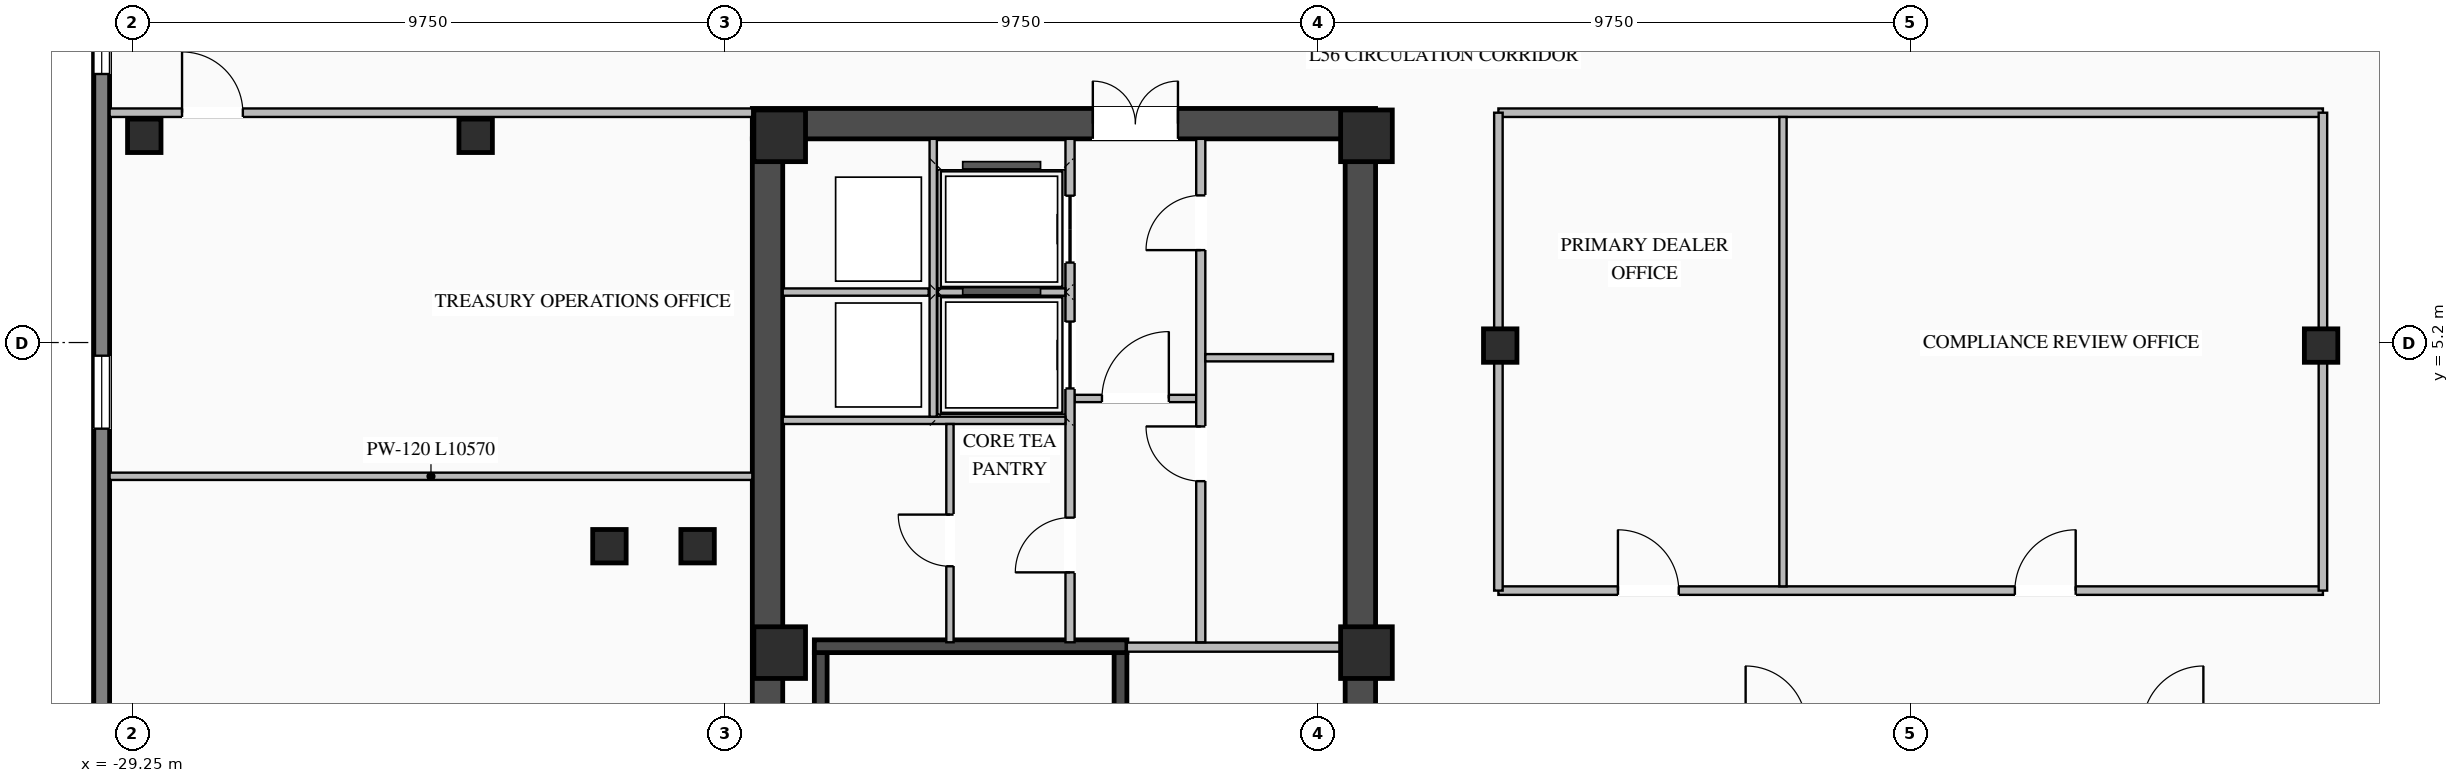
"""IFC4 building model, lengths in metres.
Left out: names, types, materials, properties, quantities, classifications, styles, units other than length and angle.
Written with IfcOpenShell. Run it as: python <this file> out.ifc"""

import sys

from ifc_helpers import new_model, si_unit, direction, frame, frame_2d, origin, origin_2d, place, context, subcontext, project, spatial, rectangle, i_section, extrude, element, fill, save


model = new_model("IFC4")
c1 = context("Model", 3, precision=1e-05, world=origin(), true_north=direction((0.0, 1.0)))
c2 = subcontext(c1, "Body", "Model", "MODEL_VIEW")
j1 = project(units=[si_unit("LENGTHUNIT", "METRE"), si_unit("PLANEANGLEUNIT", "RADIAN")], contexts=[c1])
p1 = place(None, origin())
s1 = spatial("IfcSite", under=j1, at=p1, CompositionType="ELEMENT")
p2 = place(p1, origin())
s2 = spatial("IfcBuilding", under=s1, at=p2, CompositionType="ELEMENT")
p3 = place(p2, frame((0.0, 0.0, 208.5)))
s3 = spatial("IfcBuildingStorey", under=s2, at=p3, CompositionType="ELEMENT", Elevation=208.5)
p4 = place(p3, frame((-19.05, 8.8, 0.0), z_axis=(0.0, 0.0, 1.0), x_axis=(1.0, 0.0, 0.0)))
e1 = element("IfcWall", 1, at=p4, inside=s3, PredefinedType="SHEAR", context=c2, shape_type="SweptSolid", body=[
    extrude(rectangle(XDim=10.25, YDim=0.5, at=frame_2d((5.125, 0.0))), origin(), (0.0, 0.0, 1.0), 3.27),
])
p5 = place(p4, frame((5.6, 0.0, 0.0)))
e2 = element("IfcOpeningElement", 2, at=p5, cuts=e1, PredefinedType="OPENING", context=c2, shape_type="SweptSolid", body=[
    extrude(rectangle(XDim=1.4, YDim=2.05, at=frame_2d((0.7, 1.025))), frame((0.0, 0.26, 0.0), z_axis=(0.0, -1.0, 0.0), x_axis=(1.0, 0.0, 0.0)), (0.0, 0.0, 1.0), 0.52),
])
p6 = place(p3, frame((-18.8, -8.55, 0.0), z_axis=(0.0, 0.0, 1.0), x_axis=(0.0, 1.0, 0.0)))
e3 = element("IfcWall", 3, at=p6, inside=s3, PredefinedType="SHEAR", context=c2, shape_type="SweptSolid", body=[
    extrude(rectangle(XDim=17.1, YDim=0.5, at=frame_2d((8.55, 0.0))), origin(), (0.0, 0.0, 1.0), 3.27),
])
p7 = place(p3, frame((-9.05, -8.55, 0.0), z_axis=(0.0, 0.0, 1.0), x_axis=(0.0, 1.0, 0.0)))
e4 = element("IfcWall", 4, at=p7, inside=s3, PredefinedType="SHEAR", context=c2, shape_type="SweptSolid", body=[
    extrude(rectangle(XDim=17.1, YDim=0.5, at=frame_2d((8.55, 0.0))), origin(), (0.0, 0.0, 1.0), 3.27),
])
p8 = place(p7, frame((5.3, 0.0, 0.0)))
e5 = element("IfcOpeningElement", 5, at=p8, cuts=e4, PredefinedType="OPENING", context=c2, shape_type="SweptSolid", body=[
    extrude(rectangle(XDim=1.1, YDim=2.08, at=frame_2d((0.55, 1.04))), frame((0.0, 0.26, 0.0), z_axis=(0.0, -1.0, 0.0), x_axis=(1.0, 0.0, 0.0)), (0.0, 0.0, 1.0), 0.52),
])
p9 = place(p3, frame((-12.995, -8.1, 0.0), z_axis=(0.0, 0.0, 1.0), x_axis=(0.0, 1.0, 0.0)))
e6 = element("IfcWall", 6, at=p9, inside=s3, PredefinedType="SHEAR", context=c2, shape_type="SweptSolid", body=[
    extrude(rectangle(XDim=8.2, YDim=0.21, at=frame_2d((4.1, 0.0))), origin(), (0.0, 0.0, 1.0), 3.27),
])
p10 = place(p9, frame((6.25, 0.0, 0.0)))
e7 = element("IfcOpeningElement", 7, at=p10, cuts=e6, PredefinedType="OPENING", context=c2, shape_type="SweptSolid", body=[
    extrude(rectangle(XDim=1.1, YDim=2.15, at=frame_2d((0.55, 1.075))), frame((0.0, 0.115, 0.0), z_axis=(0.0, -1.0, 0.0), x_axis=(1.0, 0.0, 0.0)), (0.0, 0.0, 1.0), 0.23),
])
p11 = place(p3, frame((-17.925, -8.1, 0.0), z_axis=(0.0, 0.0, 1.0), x_axis=(0.0, 1.0, 0.0)))
e8 = element("IfcWall", 8, at=p11, inside=s3, PredefinedType="SHEAR", context=c2, shape_type="SweptSolid", body=[
    extrude(rectangle(XDim=8.2, YDim=0.21, at=frame_2d((4.1, 0.0))), origin(), (0.0, 0.0, 1.0), 3.27),
])
p12 = place(p3, frame((-12.89, 0.205, 0.0), z_axis=(0.0, 0.0, 1.0), x_axis=(-1.0, 0.0, 0.0)))
e9 = element("IfcWall", 9, at=p12, inside=s3, PredefinedType="SHEAR", context=c2, shape_type="SweptSolid", body=[
    extrude(rectangle(XDim=5.14, YDim=0.21, at=frame_2d((2.57, 0.0))), origin(), (0.0, 0.0, 1.0), 3.27),
])
for number, where, z_axis, x_axis in (
    (10, (-8.95, 0.1, 0.0), (0.0, 0.0, 1.0), (1.0, 0.0, 0.0)),
    (11, (-8.95, 8.6, 0.0), (0.0, 0.0, 1.0), (1.0, 0.0, 0.0)),
    (12, (-18.6, 0.1, 0.0), (0.0, 0.0, 1.0), (1.0, 0.0, 0.0)),
    (13, (-18.6, 8.6, 0.0), (0.0, 0.0, 1.0), (1.0, 0.0, 0.0)),
):
    element("IfcColumn", number, at=place(p3, frame(where, z_axis=z_axis, x_axis=x_axis)), inside=s3, PredefinedType="COLUMN", context=c2, shape_type="SweptSolid", body=[
        extrude(rectangle(XDim=0.85, YDim=0.85, at=origin_2d()), origin(), (0.0, 0.0, 1.0), 3.45),
    ])
for number, where, z_axis, x_axis in (
    (14, (-6.75, 5.15, 0.0), (0.0, 0.0, 1.0), (1.0, 0.0, 0.0)),
    (15, (6.75, 5.15, 0.0), (0.0, 0.0, 1.0), (1.0, 0.0, 0.0)),
    (16, (-21.4, 1.85, 0.0), (0.0, 0.0, 1.0), (1.0, 0.0, 0.0)),
    (17, (-19.95, 1.85, 0.0), (0.0, 0.0, 1.0), (1.0, 0.0, 0.0)),
    (18, (-23.6, 8.6, 0.0), (0.0, 0.0, 1.0), (1.0, 0.0, 0.0)),
    (19, (-29.05, 8.6, 0.0), (0.0, 0.0, 1.0), (1.0, 0.0, 0.0)),
):
    element("IfcColumn", number, at=place(p3, frame(where, z_axis=z_axis, x_axis=x_axis)), inside=s3, PredefinedType="COLUMN", context=c2, shape_type="SweptSolid", body=[
        extrude(i_section(OverallWidth=0.55, OverallDepth=0.55, WebThickness=0.024, FlangeThickness=0.036, at=origin_2d()), origin(), (0.0, 0.0, 1.0), 3.45),
    ])
p13 = place(p3, frame((-29.75, -0.9, 0.0), z_axis=(0.0, 0.0, 1.0), x_axis=(0.0, 1.0, 0.0)))
e20 = element("IfcWall", 20, at=p13, inside=s3, PredefinedType="STANDARD", context=c2, shape_type="SweptSolid", body=[
    extrude(rectangle(XDim=15.85, YDim=0.26, at=frame_2d((7.925, 0.0))), origin(), (0.0, 0.0, 1.0), 3.25),
])
p14 = place(p13, frame((4.683, 0.0, 0.76)))
e21 = element("IfcOpeningElement", 21, at=p14, cuts=e20, PredefinedType="OPENING", context=c2, shape_type="SweptSolid", body=[
    extrude(rectangle(XDim=1.2, YDim=1.95, at=frame_2d((0.6, 0.975))), frame((0.0, 0.14, 0.0), z_axis=(0.0, -1.0, 0.0), x_axis=(1.0, 0.0, 0.0)), (0.0, 0.0, 1.0), 0.28),
])
p15 = place(p13, frame((10.517, 0.0, 0.76)))
e22 = element("IfcOpeningElement", 22, at=p15, cuts=e20, PredefinedType="OPENING", context=c2, shape_type="SweptSolid", body=[
    extrude(rectangle(XDim=1.2, YDim=1.95, at=frame_2d((0.6, 0.975))), frame((0.0, 0.14, 0.0), z_axis=(0.0, -1.0, 0.0), x_axis=(1.0, 0.0, 0.0)), (0.0, 0.0, 1.0), 0.28),
])
p16 = place(p3, frame((-12.89, 0.19, 0.0), z_axis=(0.0, 0.0, 1.0), x_axis=(1.0, 0.0, 0.0)))
e23 = element("IfcWall", 23, at=p16, inside=s3, PredefinedType="STANDARD", context=c2, shape_type="SweptSolid", body=[
    extrude(rectangle(XDim=3.59, YDim=0.15, at=frame_2d((1.795, 0.0))), origin(), (0.0, 0.0, 1.0), 2.645),
])
p17 = place(p3, frame((-13.75, 4.28, 0.0), z_axis=(0.0, 0.0, 1.0), x_axis=(1.0, 0.0, 0.0)))
e24 = element("IfcWall", 24, at=p17, inside=s3, PredefinedType="STANDARD", context=c2, shape_type="SweptSolid", body=[
    extrude(rectangle(XDim=2.0, YDim=0.12, at=frame_2d((1.0, 0.0))), origin(), (0.0, 0.0, 1.0), 3.25),
])
p18 = place(p17, frame((0.45, 0.0, 0.0)))
e25 = element("IfcOpeningElement", 25, at=p18, cuts=e24, PredefinedType="OPENING", context=c2, shape_type="SweptSolid", body=[
    extrude(rectangle(XDim=1.1, YDim=2.1, at=frame_2d((0.55, 1.05))), frame((0.0, 0.07, 0.0), z_axis=(0.0, -1.0, 0.0), x_axis=(1.0, 0.0, 0.0)), (0.0, 0.0, 1.0), 0.14),
])
p19 = place(p3, frame((-11.675, 0.27, 0.0), z_axis=(0.0, 0.0, 1.0), x_axis=(0.0, 1.0, 0.0)))
e26 = element("IfcWall", 26, at=p19, inside=s3, PredefinedType="STANDARD", context=c2, shape_type="SweptSolid", body=[
    extrude(rectangle(XDim=8.28, YDim=0.15, at=frame_2d((4.14, 0.0))), origin(), (0.0, 0.0, 1.0), 3.25),
])
p20 = place(p19, frame((2.65, 0.0, 0.0)))
e27 = element("IfcOpeningElement", 27, at=p20, cuts=e26, PredefinedType="OPENING", context=c2, shape_type="SweptSolid", body=[
    extrude(rectangle(XDim=0.9, YDim=2.05, at=frame_2d((0.45, 1.025))), frame((0.0, 0.085, 0.0), z_axis=(0.0, -1.0, 0.0), x_axis=(1.0, 0.0, 0.0)), (0.0, 0.0, 1.0), 0.17),
])
p21 = place(p19, frame((6.45, 0.0, 0.0)))
e28 = element("IfcOpeningElement", 28, at=p21, cuts=e26, PredefinedType="OPENING", context=c2, shape_type="SweptSolid", body=[
    extrude(rectangle(XDim=0.9, YDim=2.05, at=frame_2d((0.45, 1.025))), frame((0.0, 0.085, 0.0), z_axis=(0.0, -1.0, 0.0), x_axis=(1.0, 0.0, 0.0)), (0.0, 0.0, 1.0), 0.17),
])
p22 = place(p3, frame((-11.6, 4.95, 0.0), z_axis=(0.0, 0.0, 1.0), x_axis=(1.0, 0.0, 0.0)))
e29 = element("IfcWall", 29, at=p22, inside=s3, PredefinedType="STANDARD", context=c2, shape_type="SweptSolid", body=[
    extrude(rectangle(XDim=2.1, YDim=0.12, at=frame_2d((1.05, 0.0))), origin(), (0.0, 0.0, 1.0), 3.25),
])
p23 = place(p3, frame((-13.825, 0.27, 0.0), z_axis=(0.0, 0.0, 1.0), x_axis=(0.0, 1.0, 0.0)))
e30 = element("IfcWall", 30, at=p23, inside=s3, PredefinedType="STANDARD", context=c2, shape_type="SweptSolid", body=[
    extrude(rectangle(XDim=8.28, YDim=0.15, at=frame_2d((4.14, 0.0))), origin(), (0.0, 0.0, 1.0), 3.25),
])
p24 = place(p23, frame((4.175, 0.0, 0.0)))
e31 = element("IfcOpeningElement", 31, at=p24, cuts=e30, PredefinedType="OPENING", context=c2, shape_type="SweptSolid", body=[
    extrude(rectangle(XDim=1.1, YDim=2.1, at=frame_2d((0.55, 1.05))), frame((0.0, 0.085, 0.0), z_axis=(0.0, -1.0, 0.0), x_axis=(1.0, 0.0, 0.0)), (0.0, 0.0, 1.0), 0.17),
])
p25 = place(p23, frame((6.245, 0.0, 0.0)))
e32 = element("IfcOpeningElement", 32, at=p25, cuts=e30, PredefinedType="OPENING", context=c2, shape_type="SweptSolid", body=[
    extrude(rectangle(XDim=1.1, YDim=2.1, at=frame_2d((0.55, 1.05))), frame((0.0, 0.085, 0.0), z_axis=(0.0, -1.0, 0.0), x_axis=(1.0, 0.0, 0.0)), (0.0, 0.0, 1.0), 0.17),
])
p26 = place(p23, frame((1.15, 0.0, 0.0)))
e33 = element("IfcOpeningElement", 33, at=p26, cuts=e30, PredefinedType="OPENING", context=c2, shape_type="SweptSolid", body=[
    extrude(rectangle(XDim=0.9, YDim=2.05, at=frame_2d((0.45, 1.025))), frame((0.0, 0.085, 0.0), z_axis=(0.0, -1.0, 0.0), x_axis=(1.0, 0.0, 0.0)), (0.0, 0.0, 1.0), 0.17),
])
p27 = place(p3, frame((-18.55, 3.92, 0.0), z_axis=(0.0, 0.0, 1.0), x_axis=(1.0, 0.0, 0.0)))
e34 = element("IfcWall", 34, at=p27, inside=s3, PredefinedType="STANDARD", context=c2, shape_type="SweptSolid", body=[
    extrude(rectangle(XDim=4.65, YDim=0.12, at=frame_2d((2.325, 0.0))), origin(), (0.0, 0.0, 1.0), 3.25),
])
p28 = place(p3, frame((-18.55, 6.03, 0.0), z_axis=(0.0, 0.0, 1.0), x_axis=(1.0, 0.0, 0.0)))
e35 = element("IfcWall", 35, at=p28, inside=s3, PredefinedType="STANDARD", context=c2, shape_type="SweptSolid", body=[
    extrude(rectangle(XDim=2.4, YDim=0.12, at=frame_2d((1.2, 0.0))), origin(), (0.0, 0.0, 1.0), 3.25),
])
p29 = place(p3, frame((-16.075, 3.98, 0.0), z_axis=(0.0, 0.0, 1.0), x_axis=(0.0, 1.0, 0.0)))
e36 = element("IfcWall", 36, at=p29, inside=s3, PredefinedType="STANDARD", context=c2, shape_type="SweptSolid", body=[
    extrude(rectangle(XDim=4.57, YDim=0.12, at=frame_2d((2.285, 0.0))), origin(), (0.0, 0.0, 1.0), 3.25),
])
p30 = place(p3, frame((-16.0, 6.03, 0.0), z_axis=(0.0, 0.0, 1.0), x_axis=(1.0, 0.0, 0.0)))
e37 = element("IfcWall", 37, at=p30, inside=s3, PredefinedType="STANDARD", context=c2, shape_type="SweptSolid", body=[
    extrude(rectangle(XDim=2.1, YDim=0.12, at=frame_2d((1.05, 0.0))), origin(), (0.0, 0.0, 1.0), 3.25),
])
p31 = place(p3, frame((-15.8, 0.27, 0.0), z_axis=(0.0, 0.0, 1.0), x_axis=(0.0, 1.0, 0.0)))
e38 = element("IfcWall", 38, at=p31, inside=s3, PredefinedType="STANDARD", context=c2, shape_type="SweptSolid", body=[
    extrude(rectangle(XDim=3.59, YDim=0.12, at=frame_2d((1.795, 0.0))), origin(), (0.0, 0.0, 1.0), 3.25),
])
p32 = place(p31, frame((1.25, 0.0, 0.0)))
e39 = element("IfcOpeningElement", 39, at=p32, cuts=e38, PredefinedType="OPENING", context=c2, shape_type="SweptSolid", body=[
    extrude(rectangle(XDim=0.85, YDim=2.05, at=frame_2d((0.425, 1.025))), frame((0.0, 0.07, 0.0), z_axis=(0.0, -1.0, 0.0), x_axis=(1.0, 0.0, 0.0)), (0.0, 0.0, 1.0), 0.14),
])
p33 = place(p3, frame((-29.62, 8.98, 0.0), z_axis=(0.0, 0.0, 1.0), x_axis=(1.0, 0.0, 0.0)))
e40 = element("IfcWall", 40, at=p33, inside=s3, PredefinedType="STANDARD", context=c2, shape_type="SweptSolid", body=[
    extrude(rectangle(XDim=10.57, YDim=0.14, at=frame_2d((5.285, 0.0))), origin(), (0.0, 0.0, 1.0), 3.25),
])
p34 = place(p33, frame((1.191, 0.0, 0.0)))
e41 = element("IfcOpeningElement", 41, at=p34, cuts=e40, PredefinedType="OPENING", context=c2, shape_type="SweptSolid", body=[
    extrude(rectangle(XDim=1.0, YDim=2.08, at=frame_2d((0.5, 1.04))), frame((0.0, 0.08, 0.0), z_axis=(0.0, -1.0, 0.0), x_axis=(1.0, 0.0, 0.0)), (0.0, 0.0, 1.0), 0.16),
])
p35 = place(p3, frame((-29.62, 3.0, 0.0), z_axis=(0.0, 0.0, 1.0), x_axis=(1.0, 0.0, 0.0)))
e42 = element("IfcWall", 42, at=p35, inside=s3, PredefinedType="STANDARD", context=c2, shape_type="SweptSolid", body=[
    extrude(rectangle(XDim=10.57, YDim=0.12, at=frame_2d((5.285, 0.0))), origin(), (0.0, 0.0, 1.0), 3.25),
])
p36 = place(p3, frame((-6.78, 1.12, 0.0), z_axis=(0.0, 0.0, 1.0), x_axis=(1.0, 0.0, 0.0)))
e43 = element("IfcWall", 43, at=p36, inside=s3, PredefinedType="STANDARD", context=c2, shape_type="SweptSolid", body=[
    extrude(rectangle(XDim=13.56, YDim=0.14, at=frame_2d((6.78, 0.0))), origin(), (0.0, 0.0, 1.0), 3.25),
])
p37 = place(p36, frame((1.966, 0.0, 0.0)))
e44 = element("IfcOpeningElement", 44, at=p37, cuts=e43, PredefinedType="OPENING", context=c2, shape_type="SweptSolid", body=[
    extrude(rectangle(XDim=1.0, YDim=2.08, at=frame_2d((0.5, 1.04))), frame((0.0, 0.08, 0.0), z_axis=(0.0, -1.0, 0.0), x_axis=(1.0, 0.0, 0.0)), (0.0, 0.0, 1.0), 0.16),
])
p38 = place(p36, frame((8.494, 0.0, 0.0)))
e45 = element("IfcOpeningElement", 45, at=p38, cuts=e43, PredefinedType="OPENING", context=c2, shape_type="SweptSolid", body=[
    extrude(rectangle(XDim=1.0, YDim=2.08, at=frame_2d((0.5, 1.04))), frame((0.0, 0.08, 0.0), z_axis=(0.0, -1.0, 0.0), x_axis=(1.0, 0.0, 0.0)), (0.0, 0.0, 1.0), 0.16),
])
p39 = place(p3, frame((-6.78, 8.98, 0.0), z_axis=(0.0, 0.0, 1.0), x_axis=(1.0, 0.0, 0.0)))
e46 = element("IfcWall", 46, at=p39, inside=s3, PredefinedType="STANDARD", context=c2, shape_type="SweptSolid", body=[
    extrude(rectangle(XDim=13.56, YDim=0.14, at=frame_2d((6.78, 0.0))), origin(), (0.0, 0.0, 1.0), 3.25),
])
for number, where, z_axis, x_axis in (
    (47, (-6.78, 1.12, 0.0), (0.0, 0.0, 1.0), (0.0, 1.0, 0.0)),
    (48, (6.78, 1.12, 0.0), (0.0, 0.0, 1.0), (0.0, 1.0, 0.0)),
):
    element("IfcWall", number, at=place(p3, frame(where, z_axis=z_axis, x_axis=x_axis)), inside=s3, PredefinedType="STANDARD", context=c2, shape_type="SweptSolid", body=[
        extrude(rectangle(XDim=7.86, YDim=0.14, at=frame_2d((3.93, 0.0))), origin(), (0.0, 0.0, 1.0), 2.645),
    ])
p40 = place(p3, frame((-2.1, 1.19, 0.0), z_axis=(0.0, 0.0, 1.0), x_axis=(0.0, 1.0, 0.0)))
e49 = element("IfcWall", 49, at=p40, inside=s3, PredefinedType="STANDARD", context=c2, shape_type="SweptSolid", body=[
    extrude(rectangle(XDim=7.72, YDim=0.12, at=frame_2d((3.86, 0.0))), origin(), (0.0, 0.0, 1.0), 3.25),
])
p41 = place(p14, origin())
e50 = element("IfcWindow", 50, at=p41, inside=s3, PartitioningType="SINGLE_PANEL", PredefinedType="WINDOW", context=c2, shape_type="SweptSolid", body=[
    extrude(rectangle(XDim=1.2, YDim=1.95, at=frame_2d((0.6, 0.975))), frame((0.0, 0.03, 0.0), z_axis=(0.0, -1.0, 0.0), x_axis=(1.0, 0.0, 0.0)), (0.0, 0.0, 1.0), 0.06),
])
fill(e21, e50)
p42 = place(p15, origin())
e51 = element("IfcWindow", 51, at=p42, inside=s3, PartitioningType="SINGLE_PANEL", PredefinedType="WINDOW", context=c2, shape_type="SweptSolid", body=[
    extrude(rectangle(XDim=1.2, YDim=1.95, at=frame_2d((0.6, 0.975))), frame((0.0, 0.03, 0.0), z_axis=(0.0, -1.0, 0.0), x_axis=(1.0, 0.0, 0.0)), (0.0, 0.0, 1.0), 0.06),
])
fill(e22, e51)
p43 = place(p18, origin())
e52 = element("IfcDoor", 52, at=p43, inside=s3, OperationType="SINGLE_SWING_RIGHT", PredefinedType="DOOR", context=c2, shape_type="SweptSolid", body=[
    extrude(rectangle(XDim=1.1, YDim=2.1, at=frame_2d((0.55, 1.05))), frame((0.0, 0.025, 0.0), z_axis=(0.0, -1.0, 0.0), x_axis=(1.0, 0.0, 0.0)), (0.0, 0.0, 1.0), 0.05),
])
fill(e25, e52)
p44 = place(p5, origin())
e53 = element("IfcDoor", 53, at=p44, inside=s3, OperationType="DOUBLE_DOOR_SINGLE_SWING", PredefinedType="DOOR", context=c2, shape_type="SweptSolid", body=[
    extrude(rectangle(XDim=1.4, YDim=2.05, at=frame_2d((0.7, 1.025))), frame((0.0, 0.195, 0.0), z_axis=(0.0, -1.0, 0.0), x_axis=(1.0, 0.0, 0.0)), (0.0, 0.0, 1.0), 0.05),
])
fill(e2, e53)
p45 = place(p20, origin())
e54 = element("IfcDoor", 54, at=p45, inside=s3, OperationType="SINGLE_SWING_RIGHT", PredefinedType="DOOR", context=c2, shape_type="SweptSolid", body=[
    extrude(rectangle(XDim=0.9, YDim=2.05, at=frame_2d((0.45, 1.025))), frame((0.0, 0.025, 0.0), z_axis=(0.0, -1.0, 0.0), x_axis=(1.0, 0.0, 0.0)), (0.0, 0.0, 1.0), 0.05),
])
fill(e27, e54)
p46 = place(p21, origin())
e55 = element("IfcDoor", 55, at=p46, inside=s3, OperationType="SINGLE_SWING_LEFT", PredefinedType="DOOR", context=c2, shape_type="SweptSolid", body=[
    extrude(rectangle(XDim=0.9, YDim=2.05, at=frame_2d((0.45, 1.025))), frame((0.0, 0.025, 0.0), z_axis=(0.0, -1.0, 0.0), x_axis=(1.0, 0.0, 0.0)), (0.0, 0.0, 1.0), 0.05),
])
fill(e28, e55)
p47 = place(p24, origin())
e56 = element("IfcDoor", 56, at=p47, inside=s3, OperationType="DOUBLE_DOOR_SLIDING", PredefinedType="DOOR", context=c2, shape_type="SweptSolid", body=[
    extrude(rectangle(XDim=1.1, YDim=2.1, at=frame_2d((0.55, 1.05))), frame((0.0, 0.025, 0.0), z_axis=(0.0, -1.0, 0.0), x_axis=(1.0, 0.0, 0.0)), (0.0, 0.0, 1.0), 0.05),
])
fill(e31, e56)
p48 = place(p25, origin())
e57 = element("IfcDoor", 57, at=p48, inside=s3, OperationType="DOUBLE_DOOR_SLIDING", PredefinedType="DOOR", context=c2, shape_type="SweptSolid", body=[
    extrude(rectangle(XDim=1.1, YDim=2.1, at=frame_2d((0.55, 1.05))), frame((0.0, 0.025, 0.0), z_axis=(0.0, -1.0, 0.0), x_axis=(1.0, 0.0, 0.0)), (0.0, 0.0, 1.0), 0.05),
])
fill(e32, e57)
p49 = place(p26, origin())
e58 = element("IfcDoor", 58, at=p49, inside=s3, OperationType="SINGLE_SWING_LEFT", PredefinedType="DOOR", context=c2, shape_type="SweptSolid", body=[
    extrude(rectangle(XDim=0.9, YDim=2.05, at=frame_2d((0.45, 1.025))), frame((0.0, 0.025, 0.0), z_axis=(0.0, -1.0, 0.0), x_axis=(1.0, 0.0, 0.0)), (0.0, 0.0, 1.0), 0.05),
])
fill(e33, e58)
p50 = place(p32, origin())
e59 = element("IfcDoor", 59, at=p50, inside=s3, OperationType="SINGLE_SWING_RIGHT", PredefinedType="DOOR", context=c2, shape_type="SweptSolid", body=[
    extrude(rectangle(XDim=0.85, YDim=2.05, at=frame_2d((0.425, 1.025))), frame((0.0, 0.025, 0.0), z_axis=(0.0, -1.0, 0.0), x_axis=(1.0, 0.0, 0.0)), (0.0, 0.0, 1.0), 0.05),
])
fill(e39, e59)
p51 = place(p34, origin())
e60 = element("IfcDoor", 60, at=p51, inside=s3, OperationType="SINGLE_SWING_LEFT", PredefinedType="DOOR", context=c2, shape_type="SweptSolid", body=[
    extrude(rectangle(XDim=1.0, YDim=2.08, at=frame_2d((0.5, 1.04))), frame((0.0, 0.025, 0.0), z_axis=(0.0, -1.0, 0.0), x_axis=(1.0, 0.0, 0.0)), (0.0, 0.0, 1.0), 0.05),
])
fill(e41, e60)
p52 = place(p37, origin())
e61 = element("IfcDoor", 61, at=p52, inside=s3, OperationType="SINGLE_SWING_LEFT", PredefinedType="DOOR", context=c2, shape_type="SweptSolid", body=[
    extrude(rectangle(XDim=1.0, YDim=2.08, at=frame_2d((0.5, 1.04))), frame((0.0, 0.025, 0.0), z_axis=(0.0, -1.0, 0.0), x_axis=(1.0, 0.0, 0.0)), (0.0, 0.0, 1.0), 0.05),
])
fill(e44, e61)
p53 = place(p38, origin())
e62 = element("IfcDoor", 62, at=p53, inside=s3, OperationType="SINGLE_SWING_RIGHT", PredefinedType="DOOR", context=c2, shape_type="SweptSolid", body=[
    extrude(rectangle(XDim=1.0, YDim=2.08, at=frame_2d((0.5, 1.04))), frame((0.0, 0.025, 0.0), z_axis=(0.0, -1.0, 0.0), x_axis=(1.0, 0.0, 0.0)), (0.0, 0.0, 1.0), 0.05),
])
fill(e45, e62)
save(model, sys.argv[1])
